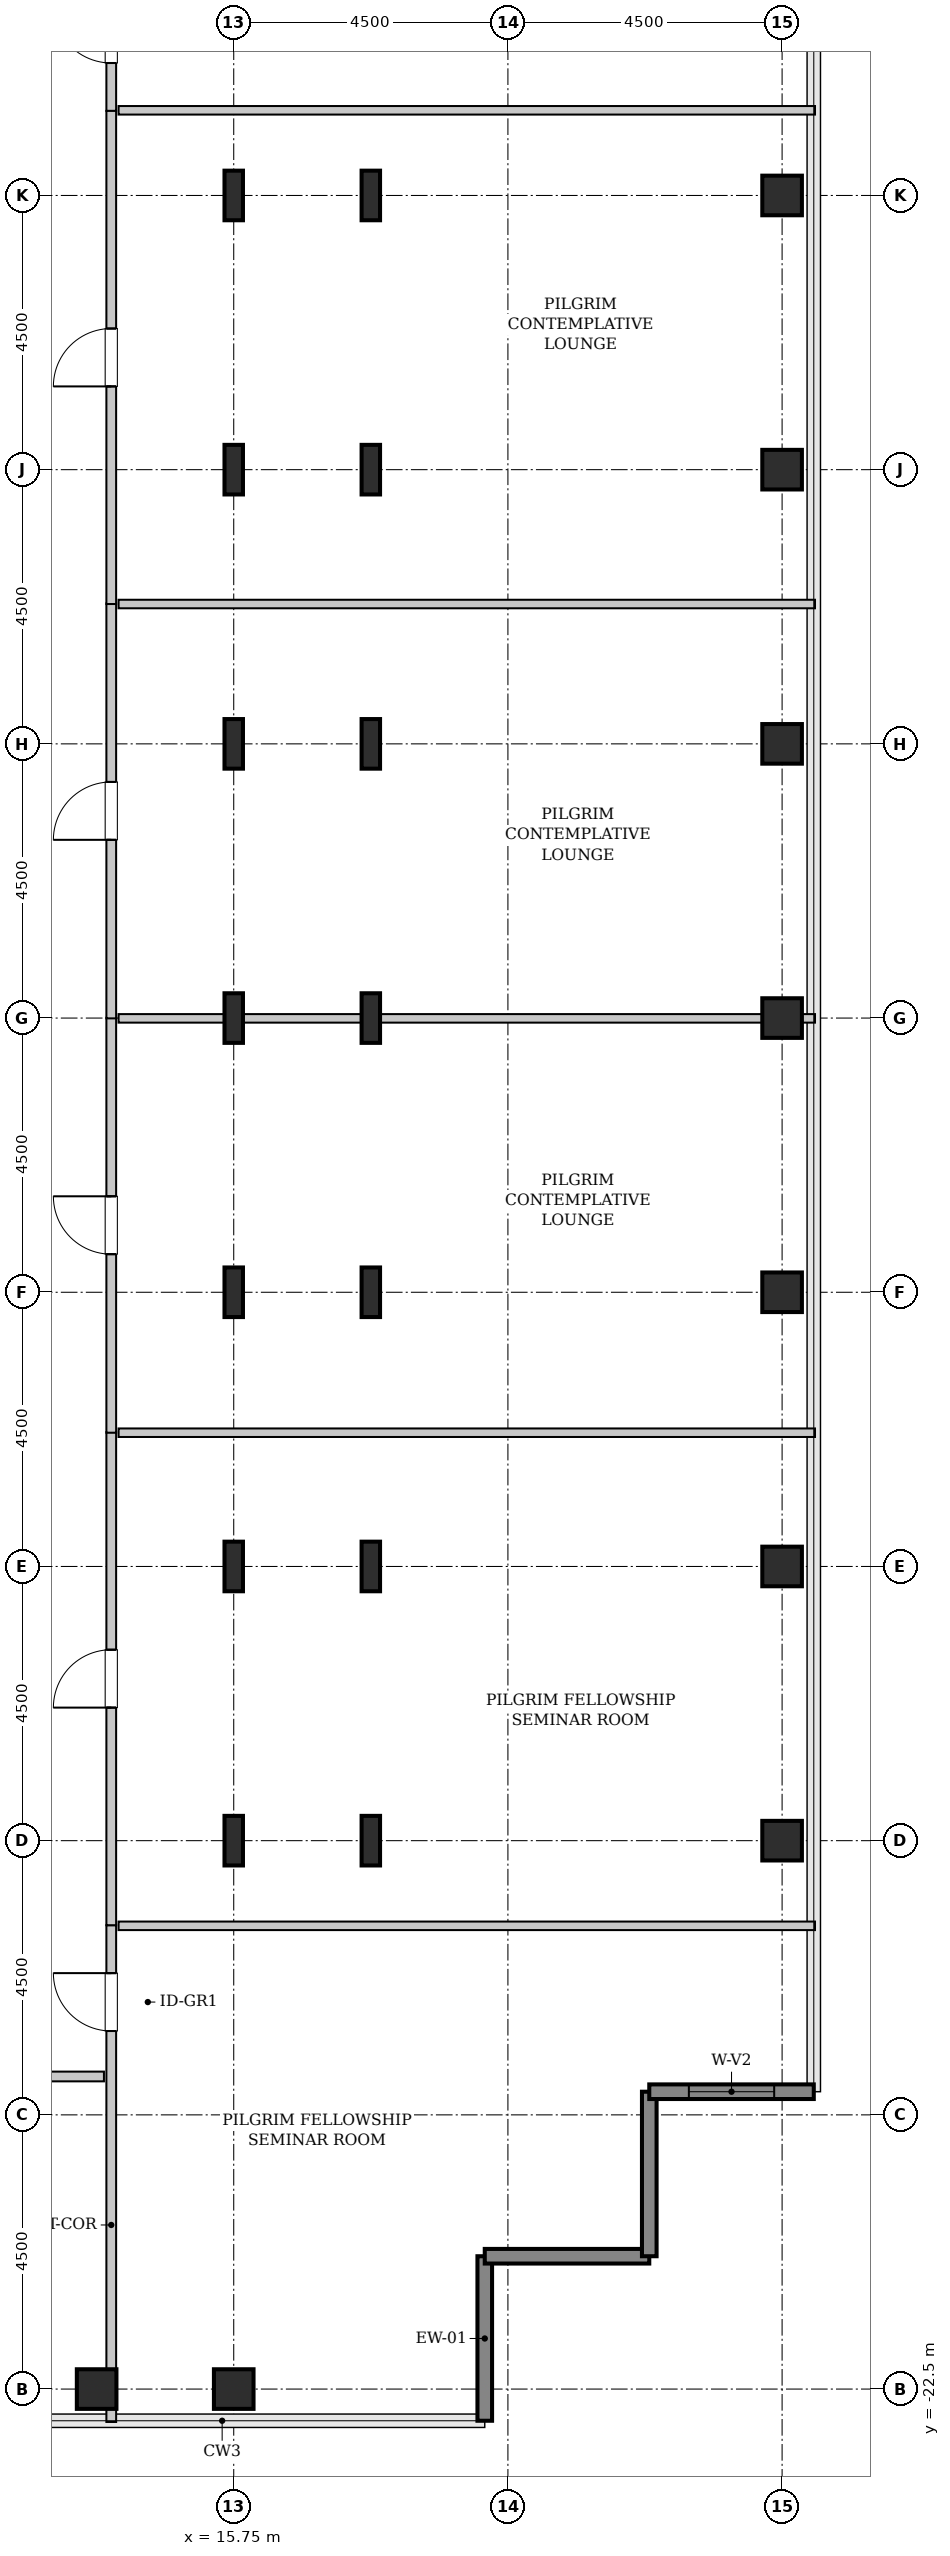
"""IFC4 building model, lengths in metres.
Left out: names, types, materials, properties, quantities, classifications, styles, units other than length and angle.
Written with IfcOpenShell. Run it as: python <this file> out.ifc"""

import sys

from ifc_helpers import new_model, si_unit, direction, frame, frame_2d, origin, origin_2d, place, context, subcontext, project, spatial, rectangle, hollow_rectangle, i_section, extrude, source, transform, mapped, element, fill, save


model = new_model("IFC4")
c1 = context("Model", 3, precision=1e-05, world=origin(), true_north=direction((0.0, 1.0)))
c2 = subcontext(c1, "Body", "Model", "MODEL_VIEW")
j1 = project(units=[si_unit("LENGTHUNIT", "METRE"), si_unit("PLANEANGLEUNIT", "RADIAN")], contexts=[c1])
p1 = place(None, origin())
s1 = spatial("IfcSite", under=j1, at=p1, CompositionType="ELEMENT")
p2 = place(p1, origin())
s2 = spatial("IfcBuilding", under=s1, at=p2, CompositionType="ELEMENT")
p3 = place(p2, frame((0.0, 0.0, 210.4)))
s3 = spatial("IfcBuildingStorey", under=s2, at=p3, CompositionType="ELEMENT", Elevation=210.4)
m1 = source(origin(), c2, "Body", "SweptSolid", [
    extrude(hollow_rectangle(XDim=0.65, YDim=0.65, WallThickness=0.032, InnerFilletRadius=0.032, OuterFilletRadius=0.064, at=origin_2d()), origin(), (0.0, 0.0, 1.0), 3.8),
])
for number, where, z_axis, x_axis in (
    (1, (13.5, -22.5, 0.0), (0.0, 0.0, 1.0), (1.0, 0.0, 0.0)),
    (2, (15.75, -22.5, 0.0), (0.0, 0.0, 1.0), (1.0, 0.0, 0.0)),
):
    element("IfcColumn", number, at=place(p3, frame(where, z_axis=z_axis, x_axis=x_axis)), inside=s3, PredefinedType="COLUMN", context=c2, shape_type="MappedRepresentation", body=[
        mapped(m1, transform((0.0, 0.0, 0.0), x_axis=(1.0, 0.0, 0.0), y_axis=(0.0, 1.0, 0.0), z_axis=(0.0, 0.0, 1.0), scale=1.0)),
    ])
m2 = source(origin(), c2, "Body", "SweptSolid", [
    extrude(i_section(OverallWidth=0.303, OverallDepth=0.814, WebThickness=0.021, FlangeThickness=0.04, FilletRadius=0.03, at=origin_2d()), origin(), (0.0, 0.0, 1.0), 3.8),
])
for number, where, z_axis, x_axis in (
    (3, (15.75, -13.5, 0.0), (0.0, 0.0, 1.0), (1.0, 0.0, 0.0)),
    (4, (15.75, -9.0, 0.0), (0.0, 0.0, 1.0), (1.0, 0.0, 0.0)),
    (5, (15.75, -4.5, 0.0), (0.0, 0.0, 1.0), (1.0, 0.0, 0.0)),
    (6, (15.75, 0.0, 0.0), (0.0, 0.0, 1.0), (1.0, 0.0, 0.0)),
    (7, (15.75, 4.5, 0.0), (0.0, 0.0, 1.0), (1.0, 0.0, 0.0)),
    (8, (15.75, 9.0, 0.0), (0.0, 0.0, 1.0), (1.0, 0.0, 0.0)),
    (9, (15.75, 13.5, 0.0), (0.0, 0.0, 1.0), (1.0, 0.0, 0.0)),
    (10, (18.0, -13.5, 0.0), (0.0, 0.0, 1.0), (1.0, 0.0, 0.0)),
    (11, (18.0, -9.0, 0.0), (0.0, 0.0, 1.0), (1.0, 0.0, 0.0)),
    (12, (18.0, -4.5, 0.0), (0.0, 0.0, 1.0), (1.0, 0.0, 0.0)),
    (13, (18.0, 0.0, 0.0), (0.0, 0.0, 1.0), (1.0, 0.0, 0.0)),
    (14, (18.0, 4.5, 0.0), (0.0, 0.0, 1.0), (1.0, 0.0, 0.0)),
    (15, (18.0, 9.0, 0.0), (0.0, 0.0, 1.0), (1.0, 0.0, 0.0)),
    (16, (18.0, 13.5, 0.0), (0.0, 0.0, 1.0), (1.0, 0.0, 0.0)),
):
    element("IfcColumn", number, at=place(p3, frame(where, z_axis=z_axis, x_axis=x_axis)), inside=s3, PredefinedType="COLUMN", context=c2, shape_type="MappedRepresentation", body=[
        mapped(m2, transform((0.0, 0.0, 0.0), x_axis=(1.0, 0.0, 0.0), y_axis=(0.0, 1.0, 0.0), z_axis=(0.0, 0.0, 1.0), scale=1.0)),
    ])
for number, where, z_axis, x_axis in (
    (17, (24.75, -13.5, 0.0), (0.0, 0.0, 1.0), (1.0, 0.0, 0.0)),
    (18, (24.75, -9.0, 0.0), (0.0, 0.0, 1.0), (1.0, 0.0, 0.0)),
    (19, (24.75, -4.5, 0.0), (0.0, 0.0, 1.0), (1.0, 0.0, 0.0)),
    (20, (24.75, 0.0, 0.0), (0.0, 0.0, 1.0), (1.0, 0.0, 0.0)),
    (21, (24.75, 4.5, 0.0), (0.0, 0.0, 1.0), (1.0, 0.0, 0.0)),
    (22, (24.75, 9.0, 0.0), (0.0, 0.0, 1.0), (1.0, 0.0, 0.0)),
    (23, (24.75, 13.5, 0.0), (0.0, 0.0, 1.0), (1.0, 0.0, 0.0)),
):
    element("IfcColumn", number, at=place(p3, frame(where, z_axis=z_axis, x_axis=x_axis)), inside=s3, PredefinedType="COLUMN", context=c2, shape_type="MappedRepresentation", body=[
        mapped(m1, transform((0.0, 0.0, 0.0), x_axis=(1.0, 0.0, 0.0), y_axis=(0.0, 1.0, 0.0), z_axis=(0.0, 0.0, 1.0), scale=1.0)),
    ])
m3 = source(origin(), c2, "Body", "SweptSolid", [
    extrude(rectangle(XDim=2.7, YDim=0.24, at=frame_2d((1.35, 0.0))), origin(), (0.0, 0.0, 1.0), 3.55),
])
for number, where, z_axis, x_axis in (
    (24, (19.87, -23.02, 0.0), (0.0, 0.0, 1.0), (0.0, 1.0, 0.0)),
    (25, (19.87, -20.32, 0.0), (0.0, 0.0, 1.0), (1.0, 0.0, 0.0)),
    (26, (22.57, -20.32, 0.0), (0.0, 0.0, 1.0), (0.0, 1.0, 0.0)),
):
    element("IfcWall", number, at=place(p3, frame(where, z_axis=z_axis, x_axis=x_axis)), inside=s3, PredefinedType="SHEAR", context=c2, shape_type="MappedRepresentation", body=[
        mapped(m3, transform((0.0, 0.0, 0.0), x_axis=(1.0, 0.0, 0.0), y_axis=(0.0, 1.0, 0.0), z_axis=(0.0, 0.0, 1.0), scale=1.0)),
    ])
p4 = place(p3, frame((22.57, -17.62, 0.0), z_axis=(0.0, 0.0, 1.0), x_axis=(1.0, 0.0, 0.0)))
e27 = element("IfcWall", 27, at=p4, inside=s3, PredefinedType="SHEAR", context=c2, shape_type="MappedRepresentation", body=[
    mapped(m3, transform((0.0, 0.0, 0.0), x_axis=(1.0, 0.0, 0.0), y_axis=(0.0, 1.0, 0.0), z_axis=(0.0, 0.0, 1.0), scale=1.0)),
])
p5 = place(p4, frame((0.65, 0.0, 0.85)))
e28 = element("IfcOpeningElement", 28, at=p5, cuts=e27, PredefinedType="OPENING", context=c2, shape_type="SweptSolid", body=[
    extrude(rectangle(XDim=1.4, YDim=1.8, at=frame_2d((0.7, 0.9))), frame((0.0, 0.13, 0.0), z_axis=(0.0, -1.0, 0.0), x_axis=(1.0, 0.0, 0.0)), (0.0, 0.0, 1.0), 0.26),
])
m4 = source(origin(), c2, "Body", "SweptSolid", [
    extrude(rectangle(XDim=8.153, YDim=0.16, at=frame_2d((4.076, 0.0))), origin(), (0.0, 0.0, 1.0), 3.535),
])
p6 = place(p3, frame((13.74, -23.04, 0.0), z_axis=(0.0, 0.0, 1.0), x_axis=(0.0, 1.0, 0.0)))
e29 = element("IfcWall", 29, at=p6, inside=s3, PredefinedType="PARTITIONING", context=c2, shape_type="MappedRepresentation", body=[
    mapped(m4, transform((0.0, 0.0, 0.0), x_axis=(1.0, 0.0, 0.0), y_axis=(0.0, 1.0, 0.0), z_axis=(0.0, 0.0, 1.0), scale=1.0)),
])
p7 = place(p6, frame((6.416, 0.0, 0.0)))
e30 = element("IfcOpeningElement", 30, at=p7, cuts=e29, PredefinedType="OPENING", context=c2, shape_type="SweptSolid", body=[
    extrude(rectangle(XDim=0.95, YDim=2.1, at=frame_2d((0.475, 1.05))), frame((0.0, 0.09, 0.0), z_axis=(0.0, -1.0, 0.0), x_axis=(1.0, 0.0, 0.0)), (0.0, 0.0, 1.0), 0.18),
])
m5 = source(origin(), c2, "Body", "SweptSolid", [
    extrude(rectangle(XDim=11.43, YDim=0.14, at=frame_2d((5.715, 0.0))), origin(), (0.0, 0.0, 1.0), 3.535),
])
p8 = place(p3, frame((13.86, -14.897, 0.0), z_axis=(0.0, 0.0, 1.0), x_axis=(1.0, 0.0, 0.0)))
e31 = element("IfcWall", 31, at=p8, inside=s3, PredefinedType="PARTITIONING", context=c2, shape_type="MappedRepresentation", body=[
    mapped(m5, transform((0.0, 0.0, 0.0), x_axis=(1.0, 0.0, 0.0), y_axis=(0.0, 1.0, 0.0), z_axis=(0.0, 0.0, 1.0), scale=1.0)),
])
m6 = source(origin(), c2, "Body", "SweptSolid", [
    extrude(rectangle(XDim=8.093, YDim=0.16, at=frame_2d((4.046, 0.0))), origin(), (0.0, 0.0, 1.0), 3.535),
])
p9 = place(p3, frame((13.74, -14.887, 0.0), z_axis=(0.0, 0.0, 1.0), x_axis=(0.0, 1.0, 0.0)))
e32 = element("IfcWall", 32, at=p9, inside=s3, PredefinedType="PARTITIONING", context=c2, shape_type="MappedRepresentation", body=[
    mapped(m6, transform((0.0, 0.0, 0.0), x_axis=(1.0, 0.0, 0.0), y_axis=(0.0, 1.0, 0.0), z_axis=(0.0, 0.0, 1.0), scale=1.0)),
])
p10 = place(p9, frame((3.571, 0.0, 0.0)))
e33 = element("IfcOpeningElement", 33, at=p10, cuts=e32, PredefinedType="OPENING", context=c2, shape_type="SweptSolid", body=[
    extrude(rectangle(XDim=0.95, YDim=2.1, at=frame_2d((0.475, 1.05))), frame((0.0, 0.09, 0.0), z_axis=(0.0, -1.0, 0.0), x_axis=(1.0, 0.0, 0.0)), (0.0, 0.0, 1.0), 0.18),
])
p11 = place(p3, frame((13.86, -6.805, 0.0), z_axis=(0.0, 0.0, 1.0), x_axis=(1.0, 0.0, 0.0)))
e34 = element("IfcWall", 34, at=p11, inside=s3, PredefinedType="PARTITIONING", context=c2, shape_type="MappedRepresentation", body=[
    mapped(m5, transform((0.0, 0.0, 0.0), x_axis=(1.0, 0.0, 0.0), y_axis=(0.0, 1.0, 0.0), z_axis=(0.0, 0.0, 1.0), scale=1.0)),
])
m7 = source(origin(), c2, "Body", "SweptSolid", [
    extrude(rectangle(XDim=6.81, YDim=0.16, at=frame_2d((3.405, 0.0))), origin(), (0.0, 0.0, 1.0), 3.535),
])
p12 = place(p3, frame((13.74, -6.805, 0.0), z_axis=(0.0, 0.0, 1.0), x_axis=(0.0, 1.0, 0.0)))
e35 = element("IfcWall", 35, at=p12, inside=s3, PredefinedType="PARTITIONING", context=c2, shape_type="MappedRepresentation", body=[
    mapped(m7, transform((0.0, 0.0, 0.0), x_axis=(1.0, 0.0, 0.0), y_axis=(0.0, 1.0, 0.0), z_axis=(0.0, 0.0, 1.0), scale=1.0)),
])
p13 = place(p12, frame((2.93, 0.0, 0.0)))
e36 = element("IfcOpeningElement", 36, at=p13, cuts=e35, PredefinedType="OPENING", context=c2, shape_type="SweptSolid", body=[
    extrude(rectangle(XDim=0.95, YDim=2.1, at=frame_2d((0.475, 1.05))), frame((0.0, 0.09, 0.0), z_axis=(0.0, -1.0, 0.0), x_axis=(1.0, 0.0, 0.0)), (0.0, 0.0, 1.0), 0.18),
])
m8 = source(origin(), c2, "Body", "SweptSolid", [
    extrude(rectangle(XDim=11.43, YDim=0.14, at=frame_2d((5.715, 0.0))), origin(), (0.0, 0.0, 1.0), 2.925),
])
p14 = place(p3, frame((13.86, -0.005, 0.0), z_axis=(0.0, 0.0, 1.0), x_axis=(1.0, 0.0, 0.0)))
e37 = element("IfcWall", 37, at=p14, inside=s3, PredefinedType="PARTITIONING", context=c2, shape_type="MappedRepresentation", body=[
    mapped(m8, transform((0.0, 0.0, 0.0), x_axis=(1.0, 0.0, 0.0), y_axis=(0.0, 1.0, 0.0), z_axis=(0.0, 0.0, 1.0), scale=1.0)),
])
p15 = place(p3, frame((13.74, -0.005, 0.0), z_axis=(0.0, 0.0, 1.0), x_axis=(0.0, 1.0, 0.0)))
e38 = element("IfcWall", 38, at=p15, inside=s3, PredefinedType="PARTITIONING", context=c2, shape_type="MappedRepresentation", body=[
    mapped(m7, transform((0.0, 0.0, 0.0), x_axis=(1.0, 0.0, 0.0), y_axis=(0.0, 1.0, 0.0), z_axis=(0.0, 0.0, 1.0), scale=1.0)),
])
p16 = place(p15, frame((2.93, 0.0, 0.0)))
e39 = element("IfcOpeningElement", 39, at=p16, cuts=e38, PredefinedType="OPENING", context=c2, shape_type="SweptSolid", body=[
    extrude(rectangle(XDim=0.95, YDim=2.1, at=frame_2d((0.475, 1.05))), frame((0.0, 0.09, 0.0), z_axis=(0.0, -1.0, 0.0), x_axis=(1.0, 0.0, 0.0)), (0.0, 0.0, 1.0), 0.18),
])
p17 = place(p3, frame((13.86, 6.795, 0.0), z_axis=(0.0, 0.0, 1.0), x_axis=(1.0, 0.0, 0.0)))
e40 = element("IfcWall", 40, at=p17, inside=s3, PredefinedType="PARTITIONING", context=c2, shape_type="MappedRepresentation", body=[
    mapped(m5, transform((0.0, 0.0, 0.0), x_axis=(1.0, 0.0, 0.0), y_axis=(0.0, 1.0, 0.0), z_axis=(0.0, 0.0, 1.0), scale=1.0)),
])
p18 = place(p3, frame((13.74, 14.887, 0.0), z_axis=(0.0, 0.0, 1.0), x_axis=(0.0, 1.0, 0.0)))
e41 = element("IfcWall", 41, at=p18, inside=s3, PredefinedType="PARTITIONING", context=c2, shape_type="MappedRepresentation", body=[
    mapped(m4, transform((0.0, 0.0, 0.0), x_axis=(1.0, 0.0, 0.0), y_axis=(0.0, 1.0, 0.0), z_axis=(0.0, 0.0, 1.0), scale=1.0)),
])
p19 = place(p18, frame((0.786, 0.0, 0.0)))
e42 = element("IfcOpeningElement", 42, at=p19, cuts=e41, PredefinedType="OPENING", context=c2, shape_type="SweptSolid", body=[
    extrude(rectangle(XDim=0.95, YDim=2.1, at=frame_2d((0.475, 1.05))), frame((0.0, 0.09, 0.0), z_axis=(0.0, -1.0, 0.0), x_axis=(1.0, 0.0, 0.0)), (0.0, 0.0, 1.0), 0.18),
])
p20 = place(p3, frame((13.86, 14.897, 0.0), z_axis=(0.0, 0.0, 1.0), x_axis=(1.0, 0.0, 0.0)))
e43 = element("IfcWall", 43, at=p20, inside=s3, PredefinedType="PARTITIONING", context=c2, shape_type="MappedRepresentation", body=[
    mapped(m5, transform((0.0, 0.0, 0.0), x_axis=(1.0, 0.0, 0.0), y_axis=(0.0, 1.0, 0.0), z_axis=(0.0, 0.0, 1.0), scale=1.0)),
])
p21 = place(p3, frame((13.74, 6.795, 0.0), z_axis=(0.0, 0.0, 1.0), x_axis=(0.0, 1.0, 0.0)))
e44 = element("IfcWall", 44, at=p21, inside=s3, PredefinedType="PARTITIONING", context=c2, shape_type="MappedRepresentation", body=[
    mapped(m6, transform((0.0, 0.0, 0.0), x_axis=(1.0, 0.0, 0.0), y_axis=(0.0, 1.0, 0.0), z_axis=(0.0, 0.0, 1.0), scale=1.0)),
])
p22 = place(p21, frame((3.571, 0.0, 0.0)))
e45 = element("IfcOpeningElement", 45, at=p22, cuts=e44, PredefinedType="OPENING", context=c2, shape_type="SweptSolid", body=[
    extrude(rectangle(XDim=0.95, YDim=2.1, at=frame_2d((0.475, 1.05))), frame((0.0, 0.09, 0.0), z_axis=(0.0, -1.0, 0.0), x_axis=(1.0, 0.0, 0.0)), (0.0, 0.0, 1.0), 0.18),
])
m9 = source(origin(), c2, "Body", "SweptSolid", [
    extrude(rectangle(XDim=6.225, YDim=0.16, at=frame_2d((3.113, 0.0))), origin(), (0.0, 0.0, 1.0), 3.535),
])
p23 = place(p3, frame((7.395, -17.37, 0.0), z_axis=(0.0, 0.0, 1.0), x_axis=(1.0, 0.0, 0.0)))
e46 = element("IfcWall", 46, at=p23, inside=s3, PredefinedType="PARTITIONING", context=c2, shape_type="MappedRepresentation", body=[
    mapped(m9, transform((0.0, 0.0, 0.0), x_axis=(1.0, 0.0, 0.0), y_axis=(0.0, 1.0, 0.0), z_axis=(0.0, 0.0, 1.0), scale=1.0)),
])
p24 = place(p23, frame((2.26, 0.0, 0.0)))
e47 = element("IfcOpeningElement", 47, at=p24, cuts=e46, PredefinedType="OPENING", context=c2, shape_type="SweptSolid", body=[
    extrude(rectangle(XDim=0.95, YDim=2.1, at=frame_2d((0.475, 1.05))), frame((0.0, 0.09, 0.0), z_axis=(0.0, -1.0, 0.0), x_axis=(1.0, 0.0, 0.0)), (0.0, 0.0, 1.0), 0.18),
])
m10 = source(origin(), c2, "Body", "SweptSolid", [
    extrude(rectangle(XDim=1.4, YDim=1.8, at=frame_2d((0.7, 0.9))), frame((0.0, 0.03, 0.0), z_axis=(0.0, -1.0, 0.0), x_axis=(1.0, 0.0, 0.0)), (0.0, 0.0, 1.0), 0.06),
])
p25 = place(p5, origin())
e48 = element("IfcWindow", 48, at=p25, inside=s3, PartitioningType="SINGLE_PANEL", PredefinedType="WINDOW", context=c2, shape_type="MappedRepresentation", body=[
    mapped(m10, transform((0.0, 0.0, 0.0), x_axis=(1.0, 0.0, 0.0), y_axis=(0.0, 1.0, 0.0), z_axis=(0.0, 0.0, 1.0), scale=1.0)),
])
fill(e28, e48)
m11 = source(origin(), c2, "Body", "SweptSolid", [
    extrude(rectangle(XDim=0.95, YDim=2.1, at=frame_2d((0.475, 1.05))), frame((0.0, 0.025, 0.0), z_axis=(0.0, -1.0, 0.0), x_axis=(1.0, 0.0, 0.0)), (0.0, 0.0, 1.0), 0.05),
])
p26 = place(p7, origin())
e49 = element("IfcDoor", 49, at=p26, inside=s3, OperationType="SINGLE_SWING_RIGHT", PredefinedType="DOOR", context=c2, shape_type="MappedRepresentation", body=[
    mapped(m11, transform((0.0, 0.0, 0.0), x_axis=(1.0, 0.0, 0.0), y_axis=(0.0, 1.0, 0.0), z_axis=(0.0, 0.0, 1.0), scale=1.0)),
])
fill(e30, e49)
p27 = place(p10, origin())
e50 = element("IfcDoor", 50, at=p27, inside=s3, OperationType="SINGLE_SWING_LEFT", PredefinedType="DOOR", context=c2, shape_type="MappedRepresentation", body=[
    mapped(m11, transform((0.0, 0.0, 0.0), x_axis=(1.0, 0.0, 0.0), y_axis=(0.0, 1.0, 0.0), z_axis=(0.0, 0.0, 1.0), scale=1.0)),
])
fill(e33, e50)
p28 = place(p13, origin())
e51 = element("IfcDoor", 51, at=p28, inside=s3, OperationType="SINGLE_SWING_RIGHT", PredefinedType="DOOR", context=c2, shape_type="MappedRepresentation", body=[
    mapped(m11, transform((0.0, 0.0, 0.0), x_axis=(1.0, 0.0, 0.0), y_axis=(0.0, 1.0, 0.0), z_axis=(0.0, 0.0, 1.0), scale=1.0)),
])
fill(e36, e51)
p29 = place(p16, origin())
e52 = element("IfcDoor", 52, at=p29, inside=s3, OperationType="SINGLE_SWING_LEFT", PredefinedType="DOOR", context=c2, shape_type="MappedRepresentation", body=[
    mapped(m11, transform((0.0, 0.0, 0.0), x_axis=(1.0, 0.0, 0.0), y_axis=(0.0, 1.0, 0.0), z_axis=(0.0, 0.0, 1.0), scale=1.0)),
])
fill(e39, e52)
p30 = place(p19, origin())
e53 = element("IfcDoor", 53, at=p30, inside=s3, OperationType="SINGLE_SWING_RIGHT", PredefinedType="DOOR", context=c2, shape_type="MappedRepresentation", body=[
    mapped(m11, transform((0.0, 0.0, 0.0), x_axis=(1.0, 0.0, 0.0), y_axis=(0.0, 1.0, 0.0), z_axis=(0.0, 0.0, 1.0), scale=1.0)),
])
fill(e42, e53)
p31 = place(p22, origin())
e54 = element("IfcDoor", 54, at=p31, inside=s3, OperationType="SINGLE_SWING_LEFT", PredefinedType="DOOR", context=c2, shape_type="MappedRepresentation", body=[
    mapped(m11, transform((0.0, 0.0, 0.0), x_axis=(1.0, 0.0, 0.0), y_axis=(0.0, 1.0, 0.0), z_axis=(0.0, 0.0, 1.0), scale=1.0)),
])
fill(e45, e54)
save(model, sys.argv[1])
